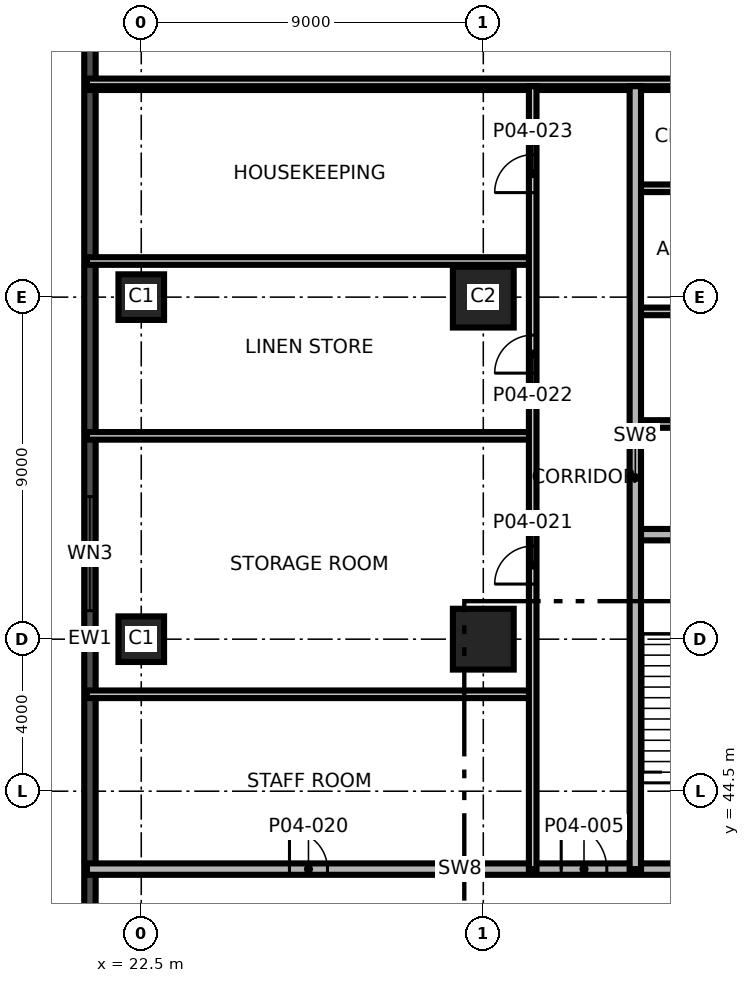
"""IFC4 building model, lengths in metres.
Left out: names, types, materials, properties, quantities, classifications, styles, units other than length and angle.
Written with IfcOpenShell. Run it as: python <this file> out.ifc"""

import sys

from ifc_helpers import new_model, si_unit, direction, frame, frame_2d, origin, origin_2d, place, context, subcontext, project, spatial, rectangle, extrude, element, fill, save


model = new_model("IFC4")
c1 = context("Model", 3, precision=1e-05, world=origin(), true_north=direction((0.0, 1.0)))
c2 = subcontext(c1, "Body", "Model", "MODEL_VIEW")
j1 = project(units=[si_unit("LENGTHUNIT", "METRE"), si_unit("PLANEANGLEUNIT", "RADIAN")], contexts=[c1])
p1 = place(None, origin())
s1 = spatial("IfcSite", under=j1, at=p1, CompositionType="ELEMENT")
p2 = place(p1, origin())
s2 = spatial("IfcBuilding", under=s1, at=p2, CompositionType="ELEMENT")
p3 = place(p2, frame((0.0, 0.0, 23.5)))
s3 = spatial("IfcBuildingStorey", under=s2, at=p3, CompositionType="ELEMENT", Elevation=23.5)
p4 = place(p3, frame((22.5, 48.5, 0.0), z_axis=(0.0, 0.0, 1.0), x_axis=(1.0, 0.0, 0.0)))
e1 = element("IfcColumn", 1, at=p4, inside=s3, PredefinedType="COLUMN", context=c2, shape_type="SweptSolid", body=[
    extrude(rectangle(XDim=1.2, YDim=1.2, at=origin_2d()), origin(), (0.0, 0.0, 1.0), 5.0),
])
p5 = place(p3, frame((31.5, 48.5, 0.0), z_axis=(0.0, 0.0, 1.0), x_axis=(1.0, 0.0, 0.0)))
e2 = element("IfcColumn", 2, at=p5, inside=s3, PredefinedType="COLUMN", context=c2, shape_type="SweptSolid", body=[
    extrude(rectangle(XDim=1.6, YDim=1.6, at=origin_2d()), origin(), (0.0, 0.0, 1.0), 5.0),
])
p6 = place(p3, frame((22.5, 57.5, 0.0), z_axis=(0.0, 0.0, 1.0), x_axis=(1.0, 0.0, 0.0)))
e3 = element("IfcColumn", 3, at=p6, inside=s3, PredefinedType="COLUMN", context=c2, shape_type="SweptSolid", body=[
    extrude(rectangle(XDim=1.2, YDim=1.2, at=origin_2d()), origin(), (0.0, 0.0, 1.0), 5.0),
])
p7 = place(p3, frame((31.5, 57.5, 0.0), z_axis=(0.0, 0.0, 1.0), x_axis=(1.0, 0.0, 0.0)))
e4 = element("IfcColumn", 4, at=p7, inside=s3, PredefinedType="COLUMN", context=c2, shape_type="SweptSolid", body=[
    extrude(rectangle(XDim=1.6, YDim=1.6, at=origin_2d()), origin(), (0.0, 0.0, 1.0), 5.0),
])
p8 = place(p3, frame((21.15, 79.952, 0.0), z_axis=(0.0, 0.0, 1.0), x_axis=(0.0, -1.0, 0.0)))
e5 = element("IfcWall", 5, at=p8, inside=s3, PredefinedType="SOLIDWALL", context=c2, shape_type="SweptSolid", body=[
    extrude(rectangle(XDim=62.88, YDim=0.3, at=frame_2d((31.44, 0.0))), origin(), (0.0, 0.0, 1.0), 4.7),
])
p9 = place(p8, frame((0.726, 0.0, 0.9)))
e6 = element("IfcOpeningElement", 6, at=p9, cuts=e5, PredefinedType="OPENING", context=c2, shape_type="SweptSolid", body=[
    extrude(rectangle(XDim=3.0, YDim=2.4, at=frame_2d((1.5, 1.2))), frame((0.0, 0.16, 0.0), z_axis=(0.0, -1.0, 0.0), x_axis=(1.0, 0.0, 0.0)), (0.0, 0.0, 1.0), 0.32),
])
p10 = place(p8, frame((5.202, 0.0, 0.9)))
e7 = element("IfcOpeningElement", 7, at=p10, cuts=e5, PredefinedType="OPENING", context=c2, shape_type="SweptSolid", body=[
    extrude(rectangle(XDim=3.0, YDim=2.4, at=frame_2d((1.5, 1.2))), frame((0.0, 0.16, 0.0), z_axis=(0.0, -1.0, 0.0), x_axis=(1.0, 0.0, 0.0)), (0.0, 0.0, 1.0), 0.32),
])
p11 = place(p8, frame((9.702, 0.0, 0.9)))
e8 = element("IfcOpeningElement", 8, at=p11, cuts=e5, PredefinedType="OPENING", context=c2, shape_type="SweptSolid", body=[
    extrude(rectangle(XDim=3.0, YDim=2.4, at=frame_2d((1.5, 1.2))), frame((0.0, 0.16, 0.0), z_axis=(0.0, -1.0, 0.0), x_axis=(1.0, 0.0, 0.0)), (0.0, 0.0, 1.0), 0.32),
])
p12 = place(p8, frame((27.702, 0.0, 0.9)))
e9 = element("IfcOpeningElement", 9, at=p12, cuts=e5, PredefinedType="OPENING", context=c2, shape_type="SweptSolid", body=[
    extrude(rectangle(XDim=3.0, YDim=2.4, at=frame_2d((1.5, 1.2))), frame((0.0, 0.16, 0.0), z_axis=(0.0, -1.0, 0.0), x_axis=(1.0, 0.0, 0.0)), (0.0, 0.0, 1.0), 0.32),
])
p13 = place(p8, frame((41.202, 0.0, 0.9)))
e10 = element("IfcOpeningElement", 10, at=p13, cuts=e5, PredefinedType="OPENING", context=c2, shape_type="SweptSolid", body=[
    extrude(rectangle(XDim=3.0, YDim=2.4, at=frame_2d((1.5, 1.2))), frame((0.0, 0.16, 0.0), z_axis=(0.0, -1.0, 0.0), x_axis=(1.0, 0.0, 0.0)), (0.0, 0.0, 1.0), 0.32),
])
p14 = place(p8, frame((45.702, 0.0, 0.9)))
e11 = element("IfcOpeningElement", 11, at=p14, cuts=e5, PredefinedType="OPENING", context=c2, shape_type="SweptSolid", body=[
    extrude(rectangle(XDim=3.0, YDim=2.4, at=frame_2d((1.5, 1.2))), frame((0.0, 0.16, 0.0), z_axis=(0.0, -1.0, 0.0), x_axis=(1.0, 0.0, 0.0)), (0.0, 0.0, 1.0), 0.32),
])
p15 = place(p8, frame((50.202, 0.0, 0.9)))
e12 = element("IfcOpeningElement", 12, at=p15, cuts=e5, PredefinedType="OPENING", context=c2, shape_type="SweptSolid", body=[
    extrude(rectangle(XDim=3.0, YDim=2.4, at=frame_2d((1.5, 1.2))), frame((0.0, 0.16, 0.0), z_axis=(0.0, -1.0, 0.0), x_axis=(1.0, 0.0, 0.0)), (0.0, 0.0, 1.0), 0.32),
])
p16 = place(p8, frame((54.702, 0.0, 0.9)))
e13 = element("IfcOpeningElement", 13, at=p16, cuts=e5, PredefinedType="OPENING", context=c2, shape_type="SweptSolid", body=[
    extrude(rectangle(XDim=3.0, YDim=2.4, at=frame_2d((1.5, 1.2))), frame((0.0, 0.16, 0.0), z_axis=(0.0, -1.0, 0.0), x_axis=(1.0, 0.0, 0.0)), (0.0, 0.0, 1.0), 0.32),
])
p17 = place(p8, frame((59.226, 0.0, 0.9)))
e14 = element("IfcOpeningElement", 14, at=p17, cuts=e5, PredefinedType="OPENING", context=c2, shape_type="SweptSolid", body=[
    extrude(rectangle(XDim=3.0, YDim=2.4, at=frame_2d((1.5, 1.2))), frame((0.0, 0.16, 0.0), z_axis=(0.0, -1.0, 0.0), x_axis=(1.0, 0.0, 0.0)), (0.0, 0.0, 1.0), 0.32),
])
p18 = place(p3, frame((21.07, 42.45, 0.0), z_axis=(0.0, 0.0, 1.0), x_axis=(1.0, 0.0, 0.0)))
e15 = element("IfcWall", 15, at=p18, inside=s3, PredefinedType="SHEAR", context=c2, shape_type="SweptSolid", body=[
    extrude(rectangle(XDim=19.63, YDim=0.3, at=frame_2d((9.815, 0.0))), origin(), (0.0, 0.0, 1.0), 4.7),
])
p19 = place(p18, frame((16.13, 0.0, 0.0)))
e16 = element("IfcOpeningElement", 16, at=p19, cuts=e15, PredefinedType="OPENING", context=c2, shape_type="SweptSolid", body=[
    extrude(rectangle(XDim=1.8, YDim=2.1, at=frame_2d((0.9, 1.05))), frame((0.0, 0.16, 0.0), z_axis=(0.0, -1.0, 0.0), x_axis=(1.0, 0.0, 0.0)), (0.0, 0.0, 1.0), 0.32),
])
p20 = place(p18, frame((12.48, 0.0, 0.0)))
e17 = element("IfcOpeningElement", 17, at=p20, cuts=e15, PredefinedType="OPENING", context=c2, shape_type="SweptSolid", body=[
    extrude(rectangle(XDim=1.2, YDim=2.1, at=frame_2d((0.6, 1.05))), frame((0.0, 0.16, 0.0), z_axis=(0.0, -1.0, 0.0), x_axis=(1.0, 0.0, 0.0)), (0.0, 0.0, 1.0), 0.32),
])
p21 = place(p18, frame((5.33, 0.0, 0.0)))
e18 = element("IfcOpeningElement", 18, at=p21, cuts=e15, PredefinedType="OPENING", context=c2, shape_type="SweptSolid", body=[
    extrude(rectangle(XDim=1.0, YDim=2.1, at=frame_2d((0.5, 1.05))), frame((0.0, 0.16, 0.0), z_axis=(0.0, -1.0, 0.0), x_axis=(1.0, 0.0, 0.0)), (0.0, 0.0, 1.0), 0.32),
])
p22 = place(p3, frame((21.07, 47.05, 0.0), z_axis=(0.0, 0.0, 1.0), x_axis=(1.0, 0.0, 0.0)))
e19 = element("IfcWall", 19, at=p22, inside=s3, PredefinedType="PARTITIONING", context=c2, shape_type="SweptSolid", body=[
    extrude(rectangle(XDim=11.73, YDim=0.2, at=frame_2d((5.865, 0.0))), origin(), (0.0, 0.0, 1.0), 4.7),
])
p23 = place(p3, frame((35.5, 51.25, 0.0), z_axis=(0.0, 0.0, 1.0), x_axis=(1.0, 0.0, 0.0)))
e20 = element("IfcWall", 20, at=p23, inside=s3, PredefinedType="SHEAR", context=c2, shape_type="SweptSolid", body=[
    extrude(rectangle(XDim=5.2, YDim=0.3, at=frame_2d((2.6, 0.0))), origin(), (0.0, 0.0, 1.0), 4.7),
])
p24 = place(p3, frame((21.07, 53.85, 0.0), z_axis=(0.0, 0.0, 1.0), x_axis=(1.0, 0.0, 0.0)))
e21 = element("IfcWall", 21, at=p24, inside=s3, PredefinedType="PARTITIONING", context=c2, shape_type="SweptSolid", body=[
    extrude(rectangle(XDim=11.73, YDim=0.2, at=frame_2d((5.865, 0.0))), origin(), (0.0, 0.0, 1.0), 4.7),
])
for number, where, z_axis, x_axis in (
    (22, (35.55, 54.162, 0.0), (0.0, 0.0, 1.0), (1.0, 0.0, 0.0)),
    (23, (35.55, 57.125, 0.0), (0.0, 0.0, 1.0), (1.0, 0.0, 0.0)),
):
    element("IfcWall", number, at=place(p3, frame(where, z_axis=z_axis, x_axis=x_axis)), inside=s3, PredefinedType="PARTITIONING", context=c2, shape_type="SweptSolid", body=[
        extrude(rectangle(XDim=5.15, YDim=0.2, at=frame_2d((2.575, 0.0))), origin(), (0.0, 0.0, 1.0), 4.7),
    ])
p25 = place(p3, frame((21.07, 58.45, 0.0), z_axis=(0.0, 0.0, 1.0), x_axis=(1.0, 0.0, 0.0)))
e24 = element("IfcWall", 24, at=p25, inside=s3, PredefinedType="PARTITIONING", context=c2, shape_type="SweptSolid", body=[
    extrude(rectangle(XDim=11.73, YDim=0.2, at=frame_2d((5.865, 0.0))), origin(), (0.0, 0.0, 1.0), 4.7),
])
p26 = place(p3, frame((35.55, 60.364, 0.0), z_axis=(0.0, 0.0, 1.0), x_axis=(1.0, 0.0, 0.0)))
e25 = element("IfcWall", 25, at=p26, inside=s3, PredefinedType="PARTITIONING", context=c2, shape_type="SweptSolid", body=[
    extrude(rectangle(XDim=5.15, YDim=0.2, at=frame_2d((2.575, 0.0))), origin(), (0.0, 0.0, 1.0), 4.7),
])
p27 = place(p3, frame((21.07, 63.05, 0.0), z_axis=(0.0, 0.0, 1.0), x_axis=(1.0, 0.0, 0.0)))
e26 = element("IfcWall", 26, at=p27, inside=s3, PredefinedType="PARTITIONING", context=c2, shape_type="SweptSolid", body=[
    extrude(rectangle(XDim=14.43, YDim=0.2, at=frame_2d((7.215, 0.0))), origin(), (0.0, 0.0, 1.0), 4.7),
])
p28 = place(p3, frame((35.55, 63.05, 0.0), z_axis=(0.0, 0.0, 1.0), x_axis=(1.0, 0.0, 0.0)))
e27 = element("IfcWall", 27, at=p28, inside=s3, PredefinedType="PARTITIONING", context=c2, shape_type="SweptSolid", body=[
    extrude(rectangle(XDim=5.15, YDim=0.2, at=frame_2d((2.575, 0.0))), origin(), (0.0, 0.0, 1.0), 4.7),
])
p29 = place(p3, frame((21.07, 63.15, 0.0), z_axis=(0.0, 0.0, 1.0), x_axis=(1.0, 0.0, 0.0)))
e28 = element("IfcWall", 28, at=p29, inside=s3, PredefinedType="PARTITIONING", context=c2, shape_type="SweptSolid", body=[
    extrude(rectangle(XDim=19.63, YDim=0.2, at=frame_2d((9.815, 0.0))), origin(), (0.0, 0.0, 1.0), 4.7),
])
p30 = place(p3, frame((32.8, 42.45, 0.0), z_axis=(0.0, 0.0, 1.0), x_axis=(0.0, 1.0, 0.0)))
e29 = element("IfcWall", 29, at=p30, inside=s3, PredefinedType="PARTITIONING", context=c2, shape_type="SweptSolid", body=[
    extrude(rectangle(XDim=20.6, YDim=0.2, at=frame_2d((10.3, 0.0))), origin(), (0.0, 0.0, 1.0), 4.7),
])
p31 = place(p30, frame((7.5, 0.0, 0.0)))
e30 = element("IfcOpeningElement", 30, at=p31, cuts=e29, PredefinedType="OPENING", context=c2, shape_type="SweptSolid", body=[
    extrude(rectangle(XDim=1.0, YDim=2.1, at=frame_2d((0.5, 1.05))), frame((0.0, 0.11, 0.0), z_axis=(0.0, -1.0, 0.0), x_axis=(1.0, 0.0, 0.0)), (0.0, 0.0, 1.0), 0.22),
])
p32 = place(p30, frame((13.05, 0.0, 0.0)))
e31 = element("IfcOpeningElement", 31, at=p32, cuts=e29, PredefinedType="OPENING", context=c2, shape_type="SweptSolid", body=[
    extrude(rectangle(XDim=1.0, YDim=2.1, at=frame_2d((0.5, 1.05))), frame((0.0, 0.11, 0.0), z_axis=(0.0, -1.0, 0.0), x_axis=(1.0, 0.0, 0.0)), (0.0, 0.0, 1.0), 0.22),
])
p33 = place(p30, frame((17.8, 0.0, 0.0)))
e32 = element("IfcOpeningElement", 32, at=p33, cuts=e29, PredefinedType="OPENING", context=c2, shape_type="SweptSolid", body=[
    extrude(rectangle(XDim=1.0, YDim=2.1, at=frame_2d((0.5, 1.05))), frame((0.0, 0.11, 0.0), z_axis=(0.0, -1.0, 0.0), x_axis=(1.0, 0.0, 0.0)), (0.0, 0.0, 1.0), 0.22),
])
p34 = place(p3, frame((35.5, 42.45, 0.0), z_axis=(0.0, 0.0, 1.0), x_axis=(0.0, 1.0, 0.0)))
e33 = element("IfcWall", 33, at=p34, inside=s3, PredefinedType="SHEAR", context=c2, shape_type="SweptSolid", body=[
    extrude(rectangle(XDim=20.6, YDim=0.3, at=frame_2d((10.3, 0.0))), origin(), (0.0, 0.0, 1.0), 4.7),
])
p35 = place(p12, origin())
e34 = element("IfcWindow", 34, at=p35, inside=s3, PartitioningType="SINGLE_PANEL", PredefinedType="WINDOW", context=c2, shape_type="SweptSolid", body=[
    extrude(rectangle(XDim=3.0, YDim=2.4, at=frame_2d((1.5, 1.2))), frame((0.0, 0.03, 0.0), z_axis=(0.0, -1.0, 0.0), x_axis=(1.0, 0.0, 0.0)), (0.0, 0.0, 1.0), 0.06),
])
fill(e9, e34)
p36 = place(p20, origin())
e35 = element("IfcDoor", 35, at=p36, inside=s3, OperationType="SINGLE_SWING_LEFT", PredefinedType="DOOR", context=c2, shape_type="SweptSolid", body=[
    extrude(rectangle(XDim=1.2, YDim=2.1, at=frame_2d((0.6, 1.05))), frame((0.0, 0.025, 0.0), z_axis=(0.0, -1.0, 0.0), x_axis=(1.0, 0.0, 0.0)), (0.0, 0.0, 1.0), 0.05),
])
fill(e17, e35)
p37 = place(p21, origin())
e36 = element("IfcDoor", 36, at=p37, inside=s3, OperationType="SINGLE_SWING_RIGHT", PredefinedType="DOOR", context=c2, shape_type="SweptSolid", body=[
    extrude(rectangle(XDim=1.0, YDim=2.1, at=frame_2d((0.5, 1.05))), frame((0.0, 0.025, 0.0), z_axis=(0.0, -1.0, 0.0), x_axis=(1.0, 0.0, 0.0)), (0.0, 0.0, 1.0), 0.05),
])
fill(e18, e36)
p38 = place(p31, origin())
e37 = element("IfcDoor", 37, at=p38, inside=s3, OperationType="SINGLE_SWING_LEFT", PredefinedType="DOOR", context=c2, shape_type="SweptSolid", body=[
    extrude(rectangle(XDim=1.0, YDim=2.1, at=frame_2d((0.5, 1.05))), frame((0.0, 0.025, 0.0), z_axis=(0.0, -1.0, 0.0), x_axis=(1.0, 0.0, 0.0)), (0.0, 0.0, 1.0), 0.05),
])
fill(e30, e37)
p39 = place(p32, origin())
e38 = element("IfcDoor", 38, at=p39, inside=s3, OperationType="SINGLE_SWING_RIGHT", PredefinedType="DOOR", context=c2, shape_type="SweptSolid", body=[
    extrude(rectangle(XDim=1.0, YDim=2.1, at=frame_2d((0.5, 1.05))), frame((0.0, 0.025, 0.0), z_axis=(0.0, -1.0, 0.0), x_axis=(1.0, 0.0, 0.0)), (0.0, 0.0, 1.0), 0.05),
])
fill(e31, e38)
p40 = place(p33, origin())
e39 = element("IfcDoor", 39, at=p40, inside=s3, OperationType="SINGLE_SWING_LEFT", PredefinedType="DOOR", context=c2, shape_type="SweptSolid", body=[
    extrude(rectangle(XDim=1.0, YDim=2.1, at=frame_2d((0.5, 1.05))), frame((0.0, 0.025, 0.0), z_axis=(0.0, -1.0, 0.0), x_axis=(1.0, 0.0, 0.0)), (0.0, 0.0, 1.0), 0.05),
])
fill(e32, e39)
save(model, sys.argv[1])
